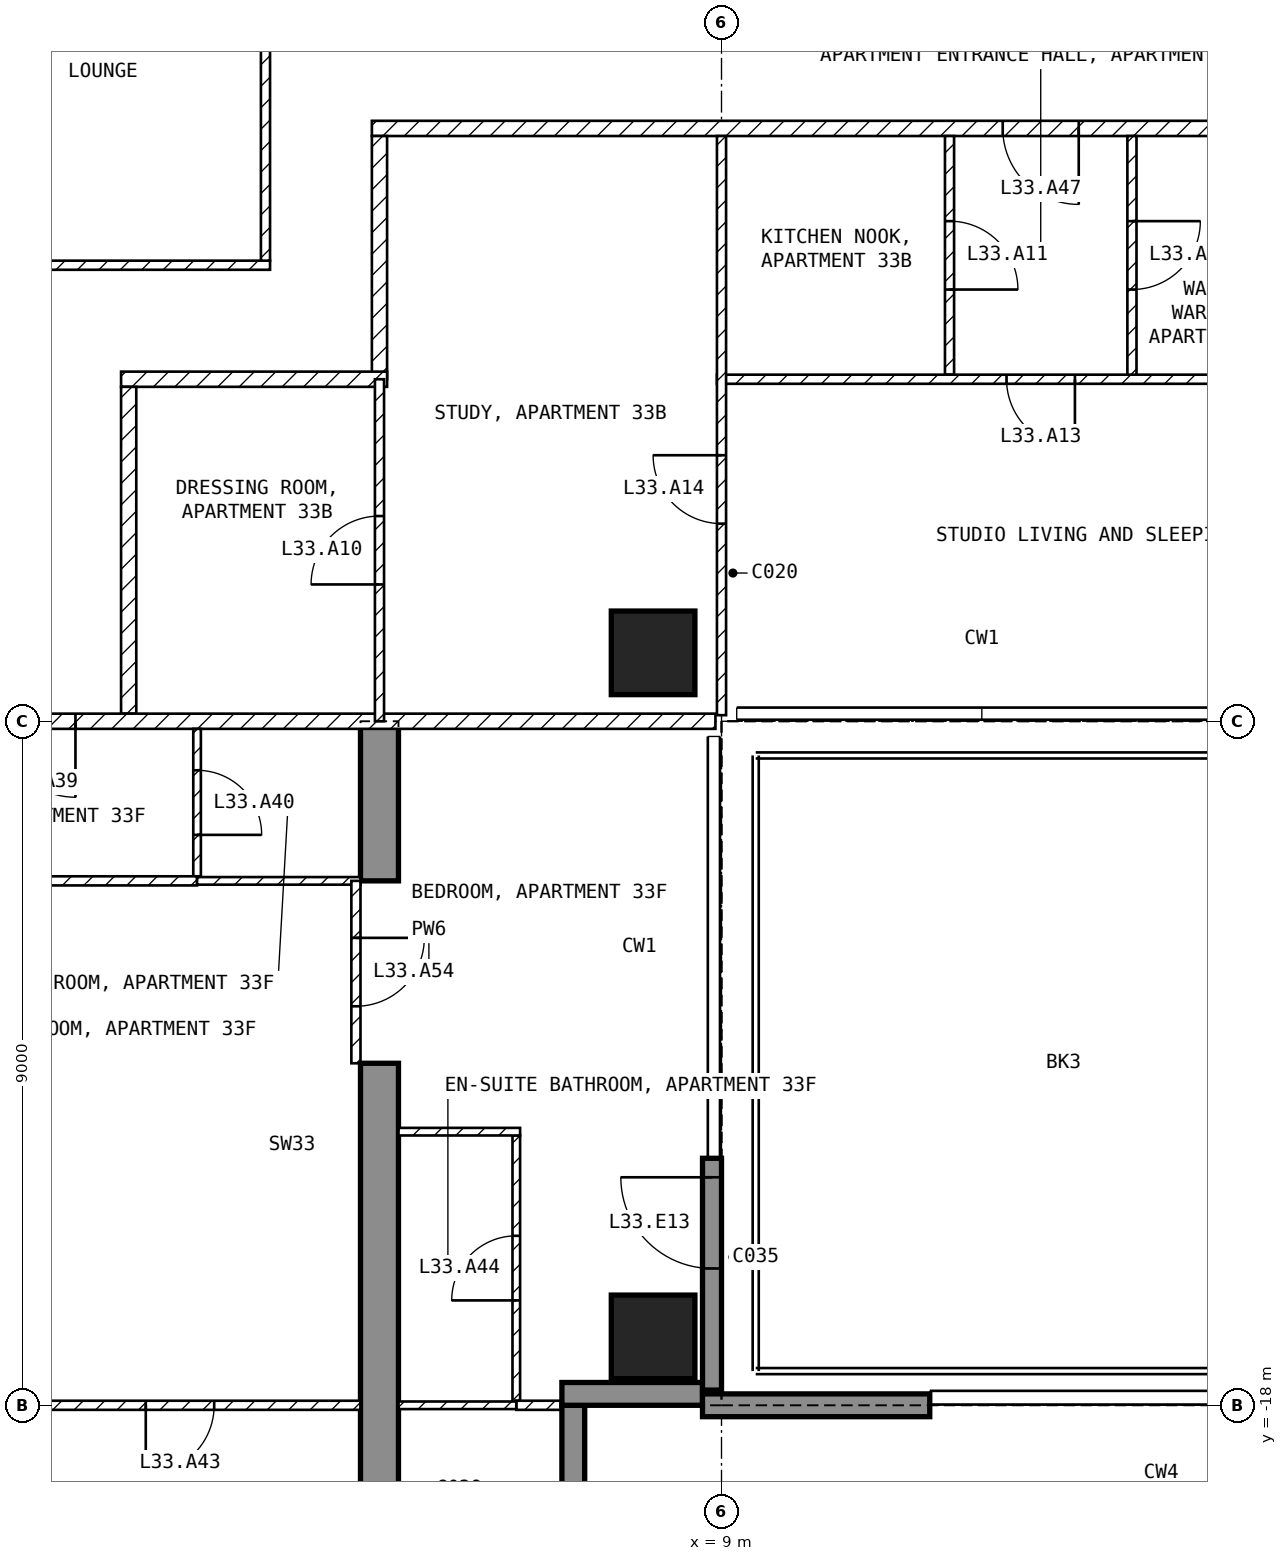
"""IFC4 building model, lengths in metres.
Left out: names, types, materials, properties, quantities, classifications, styles, units other than length and angle.
Written with IfcOpenShell. Run it as: python <this file> out.ifc"""

import sys

from ifc_helpers import new_model, si_unit, direction, frame, frame_2d, origin, origin_2d, place, context, subcontext, project, spatial, polyline, rectangle, outline, extrude, element, fill, save


model = new_model("IFC4")
c1 = context("Model", 3, precision=1e-05, world=origin(), true_north=direction((0.0, 1.0)))
c2 = subcontext(c1, "Body", "Model", "MODEL_VIEW")
j1 = project(units=[si_unit("LENGTHUNIT", "METRE"), si_unit("PLANEANGLEUNIT", "RADIAN")], contexts=[c1])
p1 = place(None, origin())
s1 = spatial("IfcSite", under=j1, at=p1, CompositionType="ELEMENT")
p2 = place(p1, origin())
s2 = spatial("IfcBuilding", under=s1, at=p2, CompositionType="ELEMENT")
p3 = place(p2, frame((0.0, 0.0, 137.4)))
s3 = spatial("IfcBuildingStorey", under=s2, at=p3, CompositionType="ELEMENT", Elevation=137.4)
for number, where, z_axis, x_axis in (
    (1, (8.1, -17.1, -0.25), (0.0, 0.0, 1.0), (1.0, 0.0, 0.0)),
    (2, (8.1, -8.1, -0.25), (0.0, 0.0, 1.0), (1.0, 0.0, 0.0)),
):
    element("IfcColumn", number, at=place(p3, frame(where, z_axis=z_axis, x_axis=x_axis)), inside=s3, PredefinedType="COLUMN", context=c2, shape_type="SweptSolid", body=[
        extrude(rectangle(XDim=1.1, YDim=1.1, at=origin_2d()), origin(), (0.0, 0.0, 1.0), 3.5),
    ])
p4 = place(p3, frame((4.25, -20.15, -0.25), z_axis=(1.0, 0.0, 0.0), x_axis=(0.0, 1.0, 0.0)))
e3 = element("IfcWall", 3, at=p4, inside=s3, PredefinedType="SHEAR", context=c2, shape_type="SweptSolid", body=[
    extrude(outline(polyline([(0.0, 0.0), (6.65, 0.0), (6.65, 2.65), (9.05, 2.65), (9.05, 0.0), (11.15, 0.0), (11.15, 3.5), (0.0, 3.5), (0.0, 0.0)])), origin(), (0.0, 0.0, 1.0), 0.5),
])
p5 = place(p3, frame((8.875, -17.8, 0.0), z_axis=(0.0, 0.0, 1.0), x_axis=(0.0, 1.0, 0.0)))
e4 = element("IfcWall", 4, at=p5, inside=s3, PredefinedType="SOLIDWALL", context=c2, shape_type="SweptSolid", body=[
    extrude(rectangle(XDim=3.05, YDim=0.25, at=frame_2d((1.525, 0.0))), origin(), (0.0, 0.0, 1.0), 3.25),
])
p6 = place(p5, frame((1.6, 0.0, 0.0)))
e5 = element("IfcOpeningElement", 5, at=p6, cuts=e4, PredefinedType="OPENING", context=c2, shape_type="SweptSolid", body=[
    extrude(rectangle(XDim=1.2, YDim=2.4, at=frame_2d((0.6, 1.2))), frame((0.0, 0.135, 0.0), z_axis=(0.0, -1.0, 0.0), x_axis=(1.0, 0.0, 0.0)), (0.0, 0.0, 1.0), 0.27),
])
p7 = place(p3, frame((7.05, -19.8, 0.0), z_axis=(0.0, 0.0, 1.0), x_axis=(0.0, 1.0, 0.0)))
e6 = element("IfcWall", 6, at=p7, inside=s3, PredefinedType="SOLIDWALL", context=c2, shape_type="SweptSolid", body=[
    extrude(rectangle(XDim=1.8, YDim=0.3, at=frame_2d((0.9, 0.0))), origin(), (0.0, 0.0, 1.0), 3.25),
])
p8 = place(p3, frame((6.9, -17.85, 0.0), z_axis=(0.0, 0.0, 1.0), x_axis=(1.0, 0.0, 0.0)))
e7 = element("IfcWall", 7, at=p8, inside=s3, PredefinedType="SOLIDWALL", context=c2, shape_type="SweptSolid", body=[
    extrude(rectangle(XDim=1.85, YDim=0.3, at=frame_2d((0.925, 0.0))), origin(), (0.0, 0.0, 1.0), 3.25),
])
p9 = place(p3, frame((8.75, -18.0, 0.0), z_axis=(0.0, 0.0, 1.0), x_axis=(1.0, 0.0, 0.0)))
e8 = element("IfcWall", 8, at=p9, inside=s3, PredefinedType="SOLIDWALL", context=c2, shape_type="SweptSolid", body=[
    extrude(rectangle(XDim=2.99, YDim=0.3, at=frame_2d((1.495, 0.0))), origin(), (0.0, 0.0, 1.0), 3.25),
])
p10 = place(p3, frame((-3.06, -3.0, 0.0), z_axis=(0.0, 0.0, 1.0), x_axis=(1.0, 0.0, 0.0)))
e9 = element("IfcWall", 9, at=p10, inside=s3, PredefinedType="PARTITIONING", context=c2, shape_type="SweptSolid", body=[
    extrude(rectangle(XDim=6.12, YDim=0.12, at=frame_2d((3.06, 0.0))), origin(), (0.0, 0.0, 1.0), 3.25),
])
p11 = place(p3, frame((3.0, -2.94, 0.0), z_axis=(0.0, 0.0, 1.0), x_axis=(0.0, 1.0, 0.0)))
e10 = element("IfcWall", 10, at=p11, inside=s3, PredefinedType="PARTITIONING", context=c2, shape_type="SweptSolid", body=[
    extrude(rectangle(XDim=5.88, YDim=0.12, at=frame_2d((2.94, 0.0))), origin(), (0.0, 0.0, 1.0), 3.25),
])
p12 = place(p3, frame((21.6, -1.2, 0.0), z_axis=(0.0, 0.0, 1.0), x_axis=(-1.0, 0.0, 0.0)))
e11 = element("IfcWall", 11, at=p12, inside=s3, PredefinedType="PARTITIONING", context=c2, shape_type="SweptSolid", body=[
    extrude(rectangle(XDim=17.2, YDim=0.2, at=frame_2d((8.6, 0.0))), origin(), (0.0, 0.0, 1.0), 3.25),
])
p13 = place(p12, frame((7.9, 0.0, 0.0)))
e12 = element("IfcOpeningElement", 12, at=p13, cuts=e11, PredefinedType="OPENING", context=c2, shape_type="SweptSolid", body=[
    extrude(rectangle(XDim=1.0, YDim=2.1, at=frame_2d((0.5, 1.05))), frame((0.0, 0.11, 0.0), z_axis=(0.0, -1.0, 0.0), x_axis=(1.0, 0.0, 0.0)), (0.0, 0.0, 1.0), 0.22),
])
p14 = place(p3, frame((4.5, -1.3, 0.0), z_axis=(0.0, 0.0, 1.0), x_axis=(0.0, -1.0, 0.0)))
e13 = element("IfcWall", 13, at=p14, inside=s3, PredefinedType="PARTITIONING", context=c2, shape_type="SweptSolid", body=[
    extrude(rectangle(XDim=3.2, YDim=0.2, at=frame_2d((1.6, 0.0))), origin(), (0.0, 0.0, 1.0), 3.25),
])
p15 = place(p3, frame((4.6, -4.5, 0.0), z_axis=(0.0, 0.0, 1.0), x_axis=(-1.0, 0.0, 0.0)))
e14 = element("IfcWall", 14, at=p15, inside=s3, PredefinedType="PARTITIONING", context=c2, shape_type="SweptSolid", body=[
    extrude(rectangle(XDim=3.5, YDim=0.2, at=frame_2d((1.75, 0.0))), origin(), (0.0, 0.0, 1.0), 3.25),
])
p16 = place(p3, frame((1.2, -4.6, 0.0), z_axis=(0.0, 0.0, 1.0), x_axis=(0.0, -1.0, 0.0)))
e15 = element("IfcWall", 15, at=p16, inside=s3, PredefinedType="PARTITIONING", context=c2, shape_type="SweptSolid", body=[
    extrude(rectangle(XDim=4.3, YDim=0.2, at=frame_2d((2.15, 0.0))), origin(), (0.0, 0.0, 1.0), 3.25),
])
p17 = place(p3, frame((8.92, -9.0, 0.0), z_axis=(0.0, 0.0, 1.0), x_axis=(-1.0, 0.0, 0.0)))
e16 = element("IfcWall", 16, at=p17, inside=s3, PredefinedType="PARTITIONING", context=c2, shape_type="SweptSolid", body=[
    extrude(rectangle(XDim=17.84, YDim=0.2, at=frame_2d((8.92, 0.0))), origin(), (0.0, 0.0, 1.0), 3.25),
])
p18 = place(p17, frame((8.42, 0.0, 0.0)))
e17 = element("IfcOpeningElement", 17, at=p18, cuts=e16, PredefinedType="OPENING", context=c2, shape_type="SweptSolid", body=[
    extrude(rectangle(XDim=1.0, YDim=2.1, at=frame_2d((0.5, 1.05))), frame((0.0, 0.11, 0.0), z_axis=(0.0, -1.0, 0.0), x_axis=(1.0, 0.0, 0.0)), (0.0, 0.0, 1.0), 0.22),
])
p19 = place(p3, frame((12.0, -1.3, 0.0), z_axis=(0.0, 0.0, 1.0), x_axis=(0.0, -1.0, 0.0)))
e18 = element("IfcWall", 18, at=p19, inside=s3, PredefinedType="PARTITIONING", context=c2, shape_type="SweptSolid", body=[
    extrude(rectangle(XDim=3.14, YDim=0.12, at=frame_2d((1.57, 0.0))), origin(), (0.0, 0.0, 1.0), 3.25),
])
p20 = place(p19, frame((1.12, 0.0, 0.0)))
e19 = element("IfcOpeningElement", 19, at=p20, cuts=e18, PredefinedType="OPENING", context=c2, shape_type="SweptSolid", body=[
    extrude(rectangle(XDim=0.9, YDim=2.1, at=frame_2d((0.45, 1.05))), frame((0.0, 0.07, 0.0), z_axis=(0.0, -1.0, 0.0), x_axis=(1.0, 0.0, 0.0)), (0.0, 0.0, 1.0), 0.14),
])
p21 = place(p3, frame((16.8, -4.5, 0.0), z_axis=(0.0, 0.0, 1.0), x_axis=(-1.0, 0.0, 0.0)))
e20 = element("IfcWall", 20, at=p21, inside=s3, PredefinedType="PARTITIONING", context=c2, shape_type="SweptSolid", body=[
    extrude(rectangle(XDim=7.86, YDim=0.12, at=frame_2d((3.93, 0.0))), origin(), (0.0, 0.0, 1.0), 3.25),
])
p22 = place(p21, frame((3.15, 0.0, 0.0)))
e21 = element("IfcOpeningElement", 21, at=p22, cuts=e20, PredefinedType="OPENING", context=c2, shape_type="SweptSolid", body=[
    extrude(rectangle(XDim=0.9, YDim=2.1, at=frame_2d((0.45, 1.05))), frame((0.0, 0.07, 0.0), z_axis=(0.0, -1.0, 0.0), x_axis=(1.0, 0.0, 0.0)), (0.0, 0.0, 1.0), 0.14),
])
p23 = place(p3, frame((9.0, -8.92, 0.0), z_axis=(0.0, 0.0, 1.0), x_axis=(0.0, 1.0, 0.0)))
e22 = element("IfcWall", 22, at=p23, inside=s3, PredefinedType="PARTITIONING", context=c2, shape_type="SweptSolid", body=[
    extrude(rectangle(XDim=7.62, YDim=0.12, at=frame_2d((3.81, 0.0))), origin(), (0.0, 0.0, 1.0), 3.25),
])
p24 = place(p23, frame((2.52, 0.0, 0.0)))
e23 = element("IfcOpeningElement", 23, at=p24, cuts=e22, PredefinedType="OPENING", context=c2, shape_type="SweptSolid", body=[
    extrude(rectangle(XDim=0.9, YDim=2.1, at=frame_2d((0.45, 1.05))), frame((0.0, 0.07, 0.0), z_axis=(0.0, -1.0, 0.0), x_axis=(1.0, 0.0, 0.0)), (0.0, 0.0, 1.0), 0.14),
])
p25 = place(p3, frame((14.4, -1.3, 0.0), z_axis=(0.0, 0.0, 1.0), x_axis=(0.0, -1.0, 0.0)))
e24 = element("IfcWall", 24, at=p25, inside=s3, PredefinedType="PARTITIONING", context=c2, shape_type="SweptSolid", body=[
    extrude(rectangle(XDim=3.14, YDim=0.12, at=frame_2d((1.57, 0.0))), origin(), (0.0, 0.0, 1.0), 3.25),
])
p26 = place(p25, frame((1.12, 0.0, 0.0)))
e25 = element("IfcOpeningElement", 25, at=p26, cuts=e24, PredefinedType="OPENING", context=c2, shape_type="SweptSolid", body=[
    extrude(rectangle(XDim=0.9, YDim=2.1, at=frame_2d((0.45, 1.05))), frame((0.0, 0.07, 0.0), z_axis=(0.0, -1.0, 0.0), x_axis=(1.0, 0.0, 0.0)), (0.0, 0.0, 1.0), 0.14),
])
p27 = place(p3, frame((4.5, -9.0, 0.0), z_axis=(0.0, 0.0, 1.0), x_axis=(0.0, 1.0, 0.0)))
e26 = element("IfcWall", 26, at=p27, inside=s3, PredefinedType="PARTITIONING", context=c2, shape_type="SweptSolid", body=[
    extrude(rectangle(XDim=4.5, YDim=0.12, at=frame_2d((2.25, 0.0))), origin(), (0.0, 0.0, 1.0), 3.25),
])
p28 = place(p27, frame((1.8, 0.0, 0.0)))
e27 = element("IfcOpeningElement", 27, at=p28, cuts=e26, PredefinedType="OPENING", context=c2, shape_type="SweptSolid", body=[
    extrude(rectangle(XDim=0.9, YDim=2.1, at=frame_2d((0.45, 1.05))), frame((0.0, 0.07, 0.0), z_axis=(0.0, -1.0, 0.0), x_axis=(1.0, 0.0, 0.0)), (0.0, 0.0, 1.0), 0.14),
])
p29 = place(p3, frame((2.1, -9.1, 0.0), z_axis=(0.0, 0.0, 1.0), x_axis=(0.0, -1.0, 0.0)))
e28 = element("IfcWall", 28, at=p29, inside=s3, PredefinedType="PARTITIONING", context=c2, shape_type="SweptSolid", body=[
    extrude(rectangle(XDim=1.94, YDim=0.1, at=frame_2d((0.97, 0.0))), origin(), (0.0, 0.0, 1.0), 3.25),
])
p30 = place(p29, frame((0.545, 0.0, 0.0)))
e29 = element("IfcOpeningElement", 29, at=p30, cuts=e28, PredefinedType="OPENING", context=c2, shape_type="SweptSolid", body=[
    extrude(rectangle(XDim=0.85, YDim=2.1, at=frame_2d((0.425, 1.05))), frame((0.0, 0.06, 0.0), z_axis=(0.0, -1.0, 0.0), x_axis=(1.0, 0.0, 0.0)), (0.0, 0.0, 1.0), 0.12),
])
p31 = place(p3, frame((2.1, -11.1, 0.0), z_axis=(0.0, 0.0, 1.0), x_axis=(-1.0, 0.0, 0.0)))
e30 = element("IfcWall", 30, at=p31, inside=s3, PredefinedType="PARTITIONING", context=c2, shape_type="SweptSolid", body=[
    extrude(rectangle(XDim=6.35, YDim=0.12, at=frame_2d((3.175, 0.0))), origin(), (0.0, 0.0, 1.0), 3.25),
])
p32 = place(p31, frame((2.725, 0.0, 0.0)))
e31 = element("IfcOpeningElement", 31, at=p32, cuts=e30, PredefinedType="OPENING", context=c2, shape_type="SweptSolid", body=[
    extrude(rectangle(XDim=0.9, YDim=2.1, at=frame_2d((0.45, 1.05))), frame((0.0, 0.07, 0.0), z_axis=(0.0, -1.0, 0.0), x_axis=(1.0, 0.0, 0.0)), (0.0, 0.0, 1.0), 0.14),
])
p33 = place(p3, frame((4.25, -11.1, 0.0), z_axis=(0.0, 0.0, 1.0), x_axis=(-1.0, 0.0, 0.0)))
e32 = element("IfcWall", 32, at=p33, inside=s3, PredefinedType="PARTITIONING", context=c2, shape_type="SweptSolid", body=[
    extrude(rectangle(XDim=2.15, YDim=0.1, at=frame_2d((1.075, 0.0))), origin(), (0.0, 0.0, 1.0), 3.25),
])
p34 = place(p3, frame((4.25, -18.0, 0.0), z_axis=(0.0, 0.0, 1.0), x_axis=(-1.0, 0.0, 0.0)))
e33 = element("IfcWall", 33, at=p34, inside=s3, PredefinedType="PARTITIONING", context=c2, shape_type="SweptSolid", body=[
    extrude(rectangle(XDim=8.5, YDim=0.12, at=frame_2d((4.25, 0.0))), origin(), (0.0, 0.0, 1.0), 3.25),
])
p35 = place(p34, frame((1.925, 0.0, 0.0)))
e34 = element("IfcOpeningElement", 34, at=p35, cuts=e33, PredefinedType="OPENING", context=c2, shape_type="SweptSolid", body=[
    extrude(rectangle(XDim=0.9, YDim=2.1, at=frame_2d((0.45, 1.05))), frame((0.0, 0.07, 0.0), z_axis=(0.0, -1.0, 0.0), x_axis=(1.0, 0.0, 0.0)), (0.0, 0.0, 1.0), 0.14),
])
p36 = place(p3, frame((6.3, -17.94, 0.0), z_axis=(0.0, 0.0, 1.0), x_axis=(0.0, 1.0, 0.0)))
e35 = element("IfcWall", 35, at=p36, inside=s3, PredefinedType="PARTITIONING", context=c2, shape_type="SweptSolid", body=[
    extrude(rectangle(XDim=3.49, YDim=0.1, at=frame_2d((1.745, 0.0))), origin(), (0.0, 0.0, 1.0), 3.25),
])
p37 = place(p36, frame((1.32, 0.0, 0.0)))
e36 = element("IfcOpeningElement", 36, at=p37, cuts=e35, PredefinedType="OPENING", context=c2, shape_type="SweptSolid", body=[
    extrude(rectangle(XDim=0.85, YDim=2.1, at=frame_2d((0.425, 1.05))), frame((0.0, 0.06, 0.0), z_axis=(0.0, -1.0, 0.0), x_axis=(1.0, 0.0, 0.0)), (0.0, 0.0, 1.0), 0.12),
])
p38 = place(p3, frame((6.35, -14.4, 0.0), z_axis=(0.0, 0.0, 1.0), x_axis=(-1.0, 0.0, 0.0)))
e37 = element("IfcWall", 37, at=p38, inside=s3, PredefinedType="PARTITIONING", context=c2, shape_type="SweptSolid", body=[
    extrude(rectangle(XDim=1.6, YDim=0.1, at=frame_2d((0.8, 0.0))), origin(), (0.0, 0.0, 1.0), 3.25),
])
p39 = place(p3, frame((7.12, -18.0, 0.0), z_axis=(0.0, 0.0, 1.0), x_axis=(-1.0, 0.0, 0.0)))
e38 = element("IfcWall", 38, at=p39, inside=s3, PredefinedType="PARTITIONING", context=c2, shape_type="SweptSolid", body=[
    extrude(rectangle(XDim=0.82, YDim=0.12, at=frame_2d((0.41, 0.0))), origin(), (0.0, 0.0, 1.0), 3.25),
])
p40 = place(p3, frame((6.3, -18.0, 0.0), z_axis=(0.0, 0.0, 1.0), x_axis=(-1.0, 0.0, 0.0)))
e39 = element("IfcWall", 39, at=p40, inside=s3, PredefinedType="PARTITIONING", context=c2, shape_type="SweptSolid", body=[
    extrude(rectangle(XDim=1.55, YDim=0.1, at=frame_2d((0.775, 0.0))), origin(), (0.0, 0.0, 1.0), 3.25),
])
p41 = place(p3, frame((4.19, -11.1, 0.0), z_axis=(0.0, 0.0, 1.0), x_axis=(0.0, -1.0, 0.0)))
e40 = element("IfcWall", 40, at=p41, inside=s3, PredefinedType="PARTITIONING", context=c2, shape_type="SweptSolid", body=[
    extrude(rectangle(XDim=2.4, YDim=0.12, at=frame_2d((1.2, 0.0))), origin(), (0.0, 0.0, 1.0), 2.4),
])
p42 = place(p41, frame((0.75, 0.0, 0.0)))
e41 = element("IfcOpeningElement", 41, at=p42, cuts=e40, PredefinedType="OPENING", context=c2, shape_type="SweptSolid", body=[
    extrude(rectangle(XDim=0.9, YDim=2.1, at=frame_2d((0.45, 1.05))), frame((0.0, 0.07, 0.0), z_axis=(0.0, -1.0, 0.0), x_axis=(1.0, 0.0, 0.0)), (0.0, 0.0, 1.0), 0.14),
])
p43 = place(p6, origin())
e42 = element("IfcDoor", 42, at=p43, inside=s3, OperationType="SINGLE_SWING_RIGHT", PredefinedType="DOOR", context=c2, shape_type="SweptSolid", body=[
    extrude(rectangle(XDim=1.2, YDim=2.4, at=frame_2d((0.6, 1.2))), frame((0.0, 0.025, 0.0), z_axis=(0.0, -1.0, 0.0), x_axis=(1.0, 0.0, 0.0)), (0.0, 0.0, 1.0), 0.05),
])
fill(e5, e42)
p44 = place(p28, origin())
e43 = element("IfcDoor", 43, at=p44, inside=s3, OperationType="SINGLE_SWING_LEFT", PredefinedType="DOOR", context=c2, shape_type="SweptSolid", body=[
    extrude(rectangle(XDim=0.9, YDim=2.1, at=frame_2d((0.45, 1.05))), frame((0.0, 0.025, 0.0), z_axis=(0.0, -1.0, 0.0), x_axis=(1.0, 0.0, 0.0)), (0.0, 0.0, 1.0), 0.05),
])
fill(e27, e43)
p45 = place(p20, origin())
e44 = element("IfcDoor", 44, at=p45, inside=s3, OperationType="SINGLE_SWING_RIGHT", PredefinedType="DOOR", context=c2, shape_type="SweptSolid", body=[
    extrude(rectangle(XDim=0.9, YDim=2.1, at=frame_2d((0.45, 1.05))), frame((0.0, 0.025, 0.0), z_axis=(0.0, -1.0, 0.0), x_axis=(1.0, 0.0, 0.0)), (0.0, 0.0, 1.0), 0.05),
])
fill(e19, e44)
p46 = place(p22, origin())
e45 = element("IfcDoor", 45, at=p46, inside=s3, OperationType="SINGLE_SWING_LEFT", PredefinedType="DOOR", context=c2, shape_type="SweptSolid", body=[
    extrude(rectangle(XDim=0.9, YDim=2.1, at=frame_2d((0.45, 1.05))), frame((0.0, 0.025, 0.0), z_axis=(0.0, -1.0, 0.0), x_axis=(1.0, 0.0, 0.0)), (0.0, 0.0, 1.0), 0.05),
])
fill(e21, e45)
p47 = place(p24, origin())
e46 = element("IfcDoor", 46, at=p47, inside=s3, OperationType="SINGLE_SWING_RIGHT", PredefinedType="DOOR", context=c2, shape_type="SweptSolid", body=[
    extrude(rectangle(XDim=0.9, YDim=2.1, at=frame_2d((0.45, 1.05))), frame((0.0, 0.025, 0.0), z_axis=(0.0, -1.0, 0.0), x_axis=(1.0, 0.0, 0.0)), (0.0, 0.0, 1.0), 0.05),
])
fill(e23, e46)
p48 = place(p26, origin())
e47 = element("IfcDoor", 47, at=p48, inside=s3, OperationType="SINGLE_SWING_LEFT", PredefinedType="DOOR", context=c2, shape_type="SweptSolid", body=[
    extrude(rectangle(XDim=0.9, YDim=2.1, at=frame_2d((0.45, 1.05))), frame((0.0, 0.025, 0.0), z_axis=(0.0, -1.0, 0.0), x_axis=(1.0, 0.0, 0.0)), (0.0, 0.0, 1.0), 0.05),
])
fill(e25, e47)
p49 = place(p18, origin())
e48 = element("IfcDoor", 48, at=p49, inside=s3, OperationType="SINGLE_SWING_LEFT", PredefinedType="DOOR", context=c2, shape_type="SweptSolid", body=[
    extrude(rectangle(XDim=1.0, YDim=2.1, at=frame_2d((0.5, 1.05))), frame((0.0, 0.025, 0.0), z_axis=(0.0, -1.0, 0.0), x_axis=(1.0, 0.0, 0.0)), (0.0, 0.0, 1.0), 0.05),
])
fill(e17, e48)
p50 = place(p30, origin())
e49 = element("IfcDoor", 49, at=p50, inside=s3, OperationType="SINGLE_SWING_RIGHT", PredefinedType="DOOR", context=c2, shape_type="SweptSolid", body=[
    extrude(rectangle(XDim=0.85, YDim=2.1, at=frame_2d((0.425, 1.05))), frame((0.0, 0.025, 0.0), z_axis=(0.0, -1.0, 0.0), x_axis=(1.0, 0.0, 0.0)), (0.0, 0.0, 1.0), 0.05),
])
fill(e29, e49)
p51 = place(p35, origin())
e50 = element("IfcDoor", 50, at=p51, inside=s3, OperationType="SINGLE_SWING_RIGHT", PredefinedType="DOOR", context=c2, shape_type="SweptSolid", body=[
    extrude(rectangle(XDim=0.9, YDim=2.1, at=frame_2d((0.45, 1.05))), frame((0.0, 0.025, 0.0), z_axis=(0.0, -1.0, 0.0), x_axis=(1.0, 0.0, 0.0)), (0.0, 0.0, 1.0), 0.05),
])
fill(e34, e50)
p52 = place(p37, origin())
e51 = element("IfcDoor", 51, at=p52, inside=s3, OperationType="SINGLE_SWING_LEFT", PredefinedType="DOOR", context=c2, shape_type="SweptSolid", body=[
    extrude(rectangle(XDim=0.85, YDim=2.1, at=frame_2d((0.425, 1.05))), frame((0.0, 0.025, 0.0), z_axis=(0.0, -1.0, 0.0), x_axis=(1.0, 0.0, 0.0)), (0.0, 0.0, 1.0), 0.05),
])
fill(e36, e51)
p53 = place(p13, origin())
e52 = element("IfcDoor", 52, at=p53, inside=s3, OperationType="SINGLE_SWING_LEFT", PredefinedType="DOOR", context=c2, shape_type="SweptSolid", body=[
    extrude(rectangle(XDim=1.0, YDim=2.1, at=frame_2d((0.5, 1.05))), frame((0.0, 0.025, 0.0), z_axis=(0.0, -1.0, 0.0), x_axis=(1.0, 0.0, 0.0)), (0.0, 0.0, 1.0), 0.05),
])
fill(e12, e52)
p54 = place(p42, origin())
e53 = element("IfcDoor", 53, at=p54, inside=s3, OperationType="SINGLE_SWING_LEFT", PredefinedType="DOOR", context=c2, shape_type="SweptSolid", body=[
    extrude(rectangle(XDim=0.9, YDim=2.1, at=frame_2d((0.45, 1.05))), frame((0.0, 0.025, 0.0), z_axis=(0.0, -1.0, 0.0), x_axis=(1.0, 0.0, 0.0)), (0.0, 0.0, 1.0), 0.05),
])
fill(e41, e53)
save(model, sys.argv[1])
